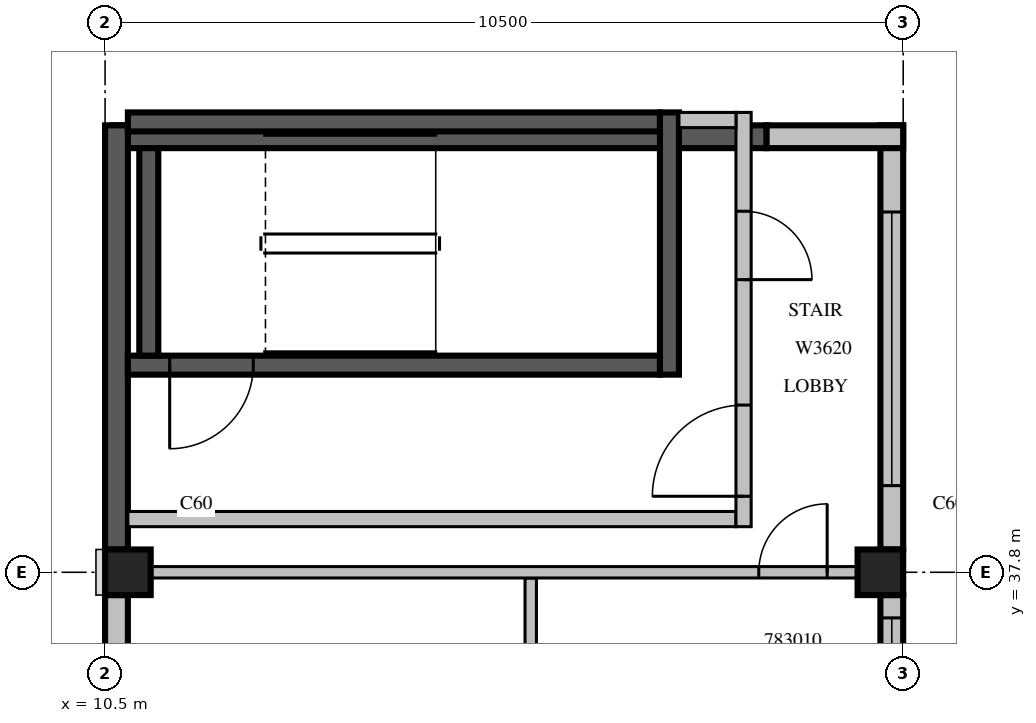
"""IFC4 building model, lengths in metres.
Left out: names, types, materials, properties, quantities, classifications, styles, units other than length and angle.
Written with IfcOpenShell. Run it as: python <this file> out.ifc"""

import sys

from ifc_helpers import new_model, si_unit, direction, frame, frame_2d, origin, origin_2d, place, context, subcontext, project, spatial, rectangle, extrude, source, transform, mapped, element, fill, save


model = new_model("IFC4")
c1 = context("Model", 3, precision=1e-05, world=origin(), true_north=direction((0.0, 1.0)))
c2 = subcontext(c1, "Body", "Model", "MODEL_VIEW")
j1 = project(units=[si_unit("LENGTHUNIT", "METRE"), si_unit("PLANEANGLEUNIT", "RADIAN")], contexts=[c1])
p1 = place(None, origin())
s1 = spatial("IfcSite", under=j1, at=p1, CompositionType="ELEMENT")
p2 = place(p1, origin())
s2 = spatial("IfcBuilding", under=s1, at=p2, CompositionType="ELEMENT")
p3 = place(p2, frame((0.0, 0.0, 351.0)))
s3 = spatial("IfcBuildingStorey", under=s2, at=p3, CompositionType="ELEMENT", Elevation=351.0)
m1 = source(origin(), c2, "Body", "SweptSolid", [
    extrude(rectangle(XDim=0.6, YDim=0.6, at=origin_2d()), origin(), (0.0, 0.0, 1.0), 3.5),
])
for number, where, z_axis, x_axis in (
    (1, (10.8, 37.8, 0.0), (0.0, 0.0, 1.0), (1.0, 0.0, 0.0)),
    (2, (20.7, 37.8, 0.0), (0.0, 0.0, 1.0), (1.0, 0.0, 0.0)),
):
    element("IfcColumn", number, at=place(p3, frame(where, z_axis=z_axis, x_axis=x_axis)), inside=s3, PredefinedType="COLUMN", context=c2, shape_type="MappedRepresentation", body=[
        mapped(m1, transform((0.0, 0.0, 0.0), scale=1.0)),
    ])
m2 = source(origin(), c2, "Body", "SweptSolid", [
    extrude(rectangle(XDim=7.8, YDim=0.3, at=frame_2d((3.9, 0.0))), origin(), (0.0, 0.0, 1.0), 3.1),
])
p4 = place(p3, frame((20.85, 29.7, 0.0), z_axis=(0.0, 0.0, 1.0), x_axis=(0.0, 1.0, 0.0)))
e3 = element("IfcWall", 3, at=p4, inside=s3, PredefinedType="STANDARD", context=c2, shape_type="MappedRepresentation", body=[
    mapped(m2, transform((0.0, 0.0, 0.0), scale=1.0)),
])
m3 = source(origin(), c2, "Body", "SweptSolid", [
    extrude(rectangle(XDim=3.0, YDim=2.0, at=frame_2d((1.5, 1.0))), frame((0.0, 0.16, 0.0), z_axis=(0.0, -1.0, 0.0), x_axis=(1.0, 0.0, 0.0)), (0.0, 0.0, 1.0), 0.32),
])
p5 = place(p4, frame((4.5, 0.0, 0.6)))
e4 = element("IfcOpeningElement", 4, at=p5, cuts=e3, PredefinedType="OPENING", context=c2, shape_type="MappedRepresentation", body=[
    mapped(m3, transform((0.0, 0.0, 0.0), scale=1.0)),
])
m4 = source(origin(), c2, "Body", "SweptSolid", [
    extrude(rectangle(XDim=1.0, YDim=2.1, at=frame_2d((0.5, 1.05))), frame((0.0, 0.16, 0.0), z_axis=(0.0, -1.0, 0.0), x_axis=(1.0, 0.0, 0.0)), (0.0, 0.0, 1.0), 0.32),
])
p6 = place(p4, frame((1.3, 0.0, 0.0)))
e5 = element("IfcOpeningElement", 5, at=p6, cuts=e3, PredefinedType="OPENING", context=c2, shape_type="MappedRepresentation", body=[
    mapped(m4, transform((0.0, 0.0, 0.0), scale=1.0)),
])
m5 = source(origin(), c2, "Body", "SweptSolid", [
    extrude(rectangle(XDim=5.58, YDim=0.3, at=frame_2d((2.79, 0.0))), origin(), (0.0, 0.0, 1.0), 3.1),
])
p7 = place(p3, frame((20.85, 38.1, 0.0), z_axis=(0.0, 0.0, 1.0), x_axis=(0.0, 1.0, 0.0)))
e6 = element("IfcWall", 6, at=p7, inside=s3, PredefinedType="STANDARD", context=c2, shape_type="MappedRepresentation", body=[
    mapped(m5, transform((0.0, 0.0, 0.0), scale=1.0)),
])
m6 = source(origin(), c2, "Body", "SweptSolid", [
    extrude(rectangle(XDim=3.6, YDim=2.0, at=frame_2d((1.8, 1.0))), frame((0.0, 0.16, 0.0), z_axis=(0.0, -1.0, 0.0), x_axis=(1.0, 0.0, 0.0)), (0.0, 0.0, 1.0), 0.32),
])
p8 = place(p7, frame((0.84, 0.0, 0.6)))
e7 = element("IfcOpeningElement", 7, at=p8, cuts=e6, PredefinedType="OPENING", context=c2, shape_type="MappedRepresentation", body=[
    mapped(m6, transform((0.0, 0.0, 0.0), scale=1.0)),
])
m7 = source(origin(), c2, "Body", "SweptSolid", [
    extrude(rectangle(XDim=1.8, YDim=0.3, at=frame_2d((0.9, 0.0))), origin(), (0.0, 0.0, 1.0), 3.1),
])
p9 = place(p3, frame((21.0, 43.53, 0.0), z_axis=(0.0, 0.0, 1.0), x_axis=(-1.0, 0.0, 0.0)))
e8 = element("IfcWall", 8, at=p9, inside=s3, PredefinedType="STANDARD", context=c2, shape_type="MappedRepresentation", body=[
    mapped(m7, transform((0.0, 0.0, 0.0), scale=1.0)),
])
m8 = source(origin(), c2, "Body", "SweptSolid", [
    extrude(rectangle(XDim=8.6, YDim=0.3, at=frame_2d((4.3, 0.0))), origin(), (0.0, 0.0, 1.0), 3.1),
])
p10 = place(p3, frame((19.2, 43.53, 0.0), z_axis=(0.0, 0.0, 1.0), x_axis=(-1.0, 0.0, 0.0)))
e9 = element("IfcWall", 9, at=p10, inside=s3, PredefinedType="SOLIDWALL", context=c2, shape_type="MappedRepresentation", body=[
    mapped(m8, transform((0.0, 0.0, 0.0), scale=1.0)),
])
m9 = source(origin(), c2, "Body", "SweptSolid", [
    extrude(rectangle(XDim=5.58, YDim=0.3, at=frame_2d((2.79, 0.0))), origin(), (0.0, 0.0, 1.0), 3.1),
])
p11 = place(p3, frame((10.65, 43.68, 0.0), z_axis=(0.0, 0.0, 1.0), x_axis=(0.0, -1.0, 0.0)))
e10 = element("IfcWall", 10, at=p11, inside=s3, PredefinedType="SOLIDWALL", context=c2, shape_type="MappedRepresentation", body=[
    mapped(m9, transform((0.0, 0.0, 0.0), scale=1.0)),
])
p12 = place(p3, frame((10.65, 37.5, 0.0), z_axis=(0.0, 0.0, 1.0), x_axis=(0.0, -1.0, 0.0)))
e11 = element("IfcWall", 11, at=p12, inside=s3, PredefinedType="STANDARD", context=c2, shape_type="MappedRepresentation", body=[
    mapped(m2, transform((0.0, 0.0, 0.0), scale=1.0)),
])
p13 = place(p12, frame((4.52, 0.0, 0.0)))
e12 = element("IfcOpeningElement", 12, at=p13, cuts=e11, PredefinedType="OPENING", context=c2, shape_type="MappedRepresentation", body=[
    mapped(m4, transform((0.0, 0.0, 0.0), scale=1.0)),
])
m10 = source(origin(), c2, "Body", "SweptSolid", [
    extrude(rectangle(XDim=7.0, YDim=0.25, at=frame_2d((3.5, 0.0))), origin(), (0.0, 0.0, 1.0), 3.1),
])
p14 = place(p3, frame((10.8, 40.525, 0.0), z_axis=(0.0, 0.0, 1.0), x_axis=(1.0, 0.0, 0.0)))
e13 = element("IfcWall", 13, at=p14, inside=s3, PredefinedType="SOLIDWALL", context=c2, shape_type="MappedRepresentation", body=[
    mapped(m10, transform((0.0, 0.0, 0.0), scale=1.0)),
])
m11 = source(origin(), c2, "Body", "SweptSolid", [
    extrude(rectangle(XDim=1.1, YDim=2.1, at=frame_2d((0.55, 1.05))), frame((0.0, 0.135, 0.0), z_axis=(0.0, -1.0, 0.0), x_axis=(1.0, 0.0, 0.0)), (0.0, 0.0, 1.0), 0.27),
])
p15 = place(p14, frame((0.55, 0.0, 0.0)))
e14 = element("IfcOpeningElement", 14, at=p15, cuts=e13, PredefinedType="OPENING", context=c2, shape_type="MappedRepresentation", body=[
    mapped(m11, transform((0.0, 0.0, 0.0), scale=1.0)),
])
p16 = place(p3, frame((10.8, 43.725, 0.0), z_axis=(0.0, 0.0, 1.0), x_axis=(1.0, 0.0, 0.0)))
e15 = element("IfcWall", 15, at=p16, inside=s3, PredefinedType="SOLIDWALL", context=c2, shape_type="MappedRepresentation", body=[
    mapped(m10, transform((0.0, 0.0, 0.0), scale=1.0)),
])
m12 = source(origin(), c2, "Body", "SweptSolid", [
    extrude(rectangle(XDim=3.45, YDim=0.25, at=frame_2d((1.725, 0.0))), origin(), (0.0, 0.0, 1.0), 3.1),
])
p17 = place(p3, frame((17.925, 40.4, 0.0), z_axis=(0.0, 0.0, 1.0), x_axis=(0.0, 1.0, 0.0)))
e16 = element("IfcWall", 16, at=p17, inside=s3, PredefinedType="SOLIDWALL", context=c2, shape_type="MappedRepresentation", body=[
    mapped(m12, transform((0.0, 0.0, 0.0), scale=1.0)),
])
m13 = source(origin(), c2, "Body", "SweptSolid", [
    extrude(rectangle(XDim=2.73, YDim=0.25, at=frame_2d((1.365, 0.0))), origin(), (0.0, 0.0, 1.0), 3.1),
])
p18 = place(p3, frame((11.075, 40.65, 0.0), z_axis=(0.0, 0.0, 1.0), x_axis=(0.0, 1.0, 0.0)))
e17 = element("IfcWall", 17, at=p18, inside=s3, PredefinedType="SOLIDWALL", context=c2, shape_type="MappedRepresentation", body=[
    mapped(m13, transform((0.0, 0.0, 0.0), scale=1.0)),
])
m14 = source(origin(), c2, "Body", "SweptSolid", [
    extrude(rectangle(XDim=8.0, YDim=0.2, at=frame_2d((4.0, 0.0))), origin(), (0.0, 0.0, 1.0), 3.1),
])
p19 = place(p3, frame((10.8, 38.5, 0.0), z_axis=(0.0, 0.0, 1.0), x_axis=(1.0, 0.0, 0.0)))
e18 = element("IfcWall", 18, at=p19, inside=s3, PredefinedType="PARTITIONING", context=c2, shape_type="MappedRepresentation", body=[
    mapped(m14, transform((0.0, 0.0, 0.0), scale=1.0)),
])
m15 = source(origin(), c2, "Body", "SweptSolid", [
    extrude(rectangle(XDim=5.45, YDim=0.2, at=frame_2d((2.725, 0.0))), origin(), (0.0, 0.0, 1.0), 3.1),
])
p20 = place(p3, frame((18.9, 38.4, 0.0), z_axis=(0.0, 0.0, 1.0), x_axis=(0.0, 1.0, 0.0)))
e19 = element("IfcWall", 19, at=p20, inside=s3, PredefinedType="PARTITIONING", context=c2, shape_type="MappedRepresentation", body=[
    mapped(m15, transform((0.0, 0.0, 0.0), scale=1.0)),
])
m16 = source(origin(), c2, "Body", "SweptSolid", [
    extrude(rectangle(XDim=1.2, YDim=2.1, at=frame_2d((0.6, 1.05))), frame((0.0, 0.11, 0.0), z_axis=(0.0, -1.0, 0.0), x_axis=(1.0, 0.0, 0.0)), (0.0, 0.0, 1.0), 0.22),
])
p21 = place(p20, frame((0.4, 0.0, 0.0)))
e20 = element("IfcOpeningElement", 20, at=p21, cuts=e19, PredefinedType="OPENING", context=c2, shape_type="MappedRepresentation", body=[
    mapped(m16, transform((0.0, 0.0, 0.0), scale=1.0)),
])
m17 = source(origin(), c2, "Body", "SweptSolid", [
    extrude(rectangle(XDim=0.9, YDim=2.1, at=frame_2d((0.45, 1.05))), frame((0.0, 0.11, 0.0), z_axis=(0.0, -1.0, 0.0), x_axis=(1.0, 0.0, 0.0)), (0.0, 0.0, 1.0), 0.22),
])
p22 = place(p20, frame((3.25, 0.0, 0.0)))
e21 = element("IfcOpeningElement", 21, at=p22, cuts=e19, PredefinedType="OPENING", context=c2, shape_type="MappedRepresentation", body=[
    mapped(m17, transform((0.0, 0.0, 0.0), scale=1.0)),
])
m18 = source(origin(), c2, "Body", "SweptSolid", [
    extrude(rectangle(XDim=0.75, YDim=0.2, at=frame_2d((0.375, 0.0))), origin(), (0.0, 0.0, 1.0), 3.1),
])
p23 = place(p3, frame((18.05, 43.75, 0.0), z_axis=(0.0, 0.0, 1.0), x_axis=(1.0, 0.0, 0.0)))
e22 = element("IfcWall", 22, at=p23, inside=s3, PredefinedType="PARTITIONING", context=c2, shape_type="MappedRepresentation", body=[
    mapped(m18, transform((0.0, 0.0, 0.0), scale=1.0)),
])
m19 = source(origin(), c2, "Body", "SweptSolid", [
    extrude(rectangle(XDim=4.105, YDim=0.15, at=frame_2d((2.053, 0.0))), origin(), (0.0, 0.0, 1.0), 3.1),
])
p24 = place(p3, frame((16.1, 37.725, 0.0), z_axis=(0.0, 0.0, 1.0), x_axis=(0.0, -1.0, 0.0)))
e23 = element("IfcWall", 23, at=p24, inside=s3, PredefinedType="PARTITIONING", context=c2, shape_type="MappedRepresentation", body=[
    mapped(m19, transform((0.0, 0.0, 0.0), scale=1.0)),
])
m20 = source(origin(), c2, "Body", "SweptSolid", [
    extrude(rectangle(XDim=1.0, YDim=2.1, at=frame_2d((0.5, 1.05))), frame((0.0, 0.085, 0.0), z_axis=(0.0, -1.0, 0.0), x_axis=(1.0, 0.0, 0.0)), (0.0, 0.0, 1.0), 0.17),
])
p25 = place(p24, frame((1.525, 0.0, 0.0)))
e24 = element("IfcOpeningElement", 24, at=p25, cuts=e23, PredefinedType="OPENING", context=c2, shape_type="MappedRepresentation", body=[
    mapped(m20, transform((0.0, 0.0, 0.0), scale=1.0)),
])
m21 = source(origin(), c2, "Body", "SweptSolid", [
    extrude(rectangle(XDim=9.302, YDim=0.15, at=frame_2d((4.651, 0.0))), origin(), (0.0, 0.0, 1.0), 3.1),
])
p26 = place(p3, frame((20.401, 37.8, 0.0), z_axis=(0.0, 0.0, 1.0), x_axis=(-1.0, 0.0, 0.0)))
e25 = element("IfcWall", 25, at=p26, inside=s3, PredefinedType="PARTITIONING", context=c2, shape_type="MappedRepresentation", body=[
    mapped(m21, transform((0.0, 0.0, 0.0), scale=1.0)),
])
m22 = source(origin(), c2, "Body", "SweptSolid", [
    extrude(rectangle(XDim=0.9, YDim=2.1, at=frame_2d((0.45, 1.05))), frame((0.0, 0.085, 0.0), z_axis=(0.0, -1.0, 0.0), x_axis=(1.0, 0.0, 0.0)), (0.0, 0.0, 1.0), 0.17),
])
p27 = place(p26, frame((0.401, 0.0, 0.0)))
e26 = element("IfcOpeningElement", 26, at=p27, cuts=e25, PredefinedType="OPENING", context=c2, shape_type="MappedRepresentation", body=[
    mapped(m22, transform((0.0, 0.0, 0.0), scale=1.0)),
])
m23 = source(origin(), c2, "Body", "SweptSolid", [
    extrude(rectangle(XDim=3.0, YDim=2.0, at=frame_2d((1.5, 1.0))), frame((0.0, 0.03, 0.0), z_axis=(0.0, -1.0, 0.0), x_axis=(1.0, 0.0, 0.0)), (0.0, 0.0, 1.0), 0.06),
])
p28 = place(p5, origin())
e27 = element("IfcWindow", 27, at=p28, inside=s3, PartitioningType="SINGLE_PANEL", PredefinedType="WINDOW", context=c2, shape_type="MappedRepresentation", body=[
    mapped(m23, transform((0.0, 0.0, 0.0), scale=1.0)),
])
fill(e4, e27)
m24 = source(origin(), c2, "Body", "SweptSolid", [
    extrude(rectangle(XDim=3.6, YDim=2.0, at=frame_2d((1.8, 1.0))), frame((0.0, 0.03, 0.0), z_axis=(0.0, -1.0, 0.0), x_axis=(1.0, 0.0, 0.0)), (0.0, 0.0, 1.0), 0.06),
])
p29 = place(p8, origin())
e28 = element("IfcWindow", 28, at=p29, inside=s3, PartitioningType="SINGLE_PANEL", PredefinedType="WINDOW", context=c2, shape_type="MappedRepresentation", body=[
    mapped(m24, transform((0.0, 0.0, 0.0), scale=1.0)),
])
fill(e7, e28)
m25 = source(origin(), c2, "Body", "SweptSolid", [
    extrude(rectangle(XDim=1.1, YDim=2.1, at=frame_2d((0.55, 1.05))), frame((0.0, 0.025, 0.0), z_axis=(0.0, -1.0, 0.0), x_axis=(1.0, 0.0, 0.0)), (0.0, 0.0, 1.0), 0.05),
])
p30 = place(p15, origin())
e29 = element("IfcDoor", 29, at=p30, inside=s3, OperationType="SINGLE_SWING_RIGHT", PredefinedType="DOOR", context=c2, shape_type="MappedRepresentation", body=[
    mapped(m25, transform((0.0, 0.0, 0.0), scale=1.0)),
])
fill(e14, e29)
m26 = source(origin(), c2, "Body", "SweptSolid", [
    extrude(rectangle(XDim=1.2, YDim=2.1, at=frame_2d((0.6, 1.05))), frame((0.0, 0.025, 0.0), z_axis=(0.0, -1.0, 0.0), x_axis=(1.0, 0.0, 0.0)), (0.0, 0.0, 1.0), 0.05),
])
p31 = place(p21, origin())
e30 = element("IfcDoor", 30, at=p31, inside=s3, OperationType="SINGLE_SWING_LEFT", PredefinedType="DOOR", context=c2, shape_type="MappedRepresentation", body=[
    mapped(m26, transform((0.0, 0.0, 0.0), scale=1.0)),
])
fill(e20, e30)
m27 = source(origin(), c2, "Body", "SweptSolid", [
    extrude(rectangle(XDim=0.9, YDim=2.1, at=frame_2d((0.45, 1.05))), frame((0.0, 0.025, 0.0), z_axis=(0.0, -1.0, 0.0), x_axis=(1.0, 0.0, 0.0)), (0.0, 0.0, 1.0), 0.05),
])
p32 = place(p22, origin())
e31 = element("IfcDoor", 31, at=p32, inside=s3, OperationType="SINGLE_SWING_RIGHT", PredefinedType="DOOR", context=c2, shape_type="MappedRepresentation", body=[
    mapped(m27, transform((0.0, 0.0, 0.0), scale=1.0)),
])
fill(e21, e31)
p33 = place(p27, origin())
e32 = element("IfcDoor", 32, at=p33, inside=s3, OperationType="SINGLE_SWING_RIGHT", PredefinedType="DOOR", context=c2, shape_type="MappedRepresentation", body=[
    mapped(m27, transform((0.0, 0.0, 0.0), scale=1.0)),
])
fill(e26, e32)
save(model, sys.argv[1])
